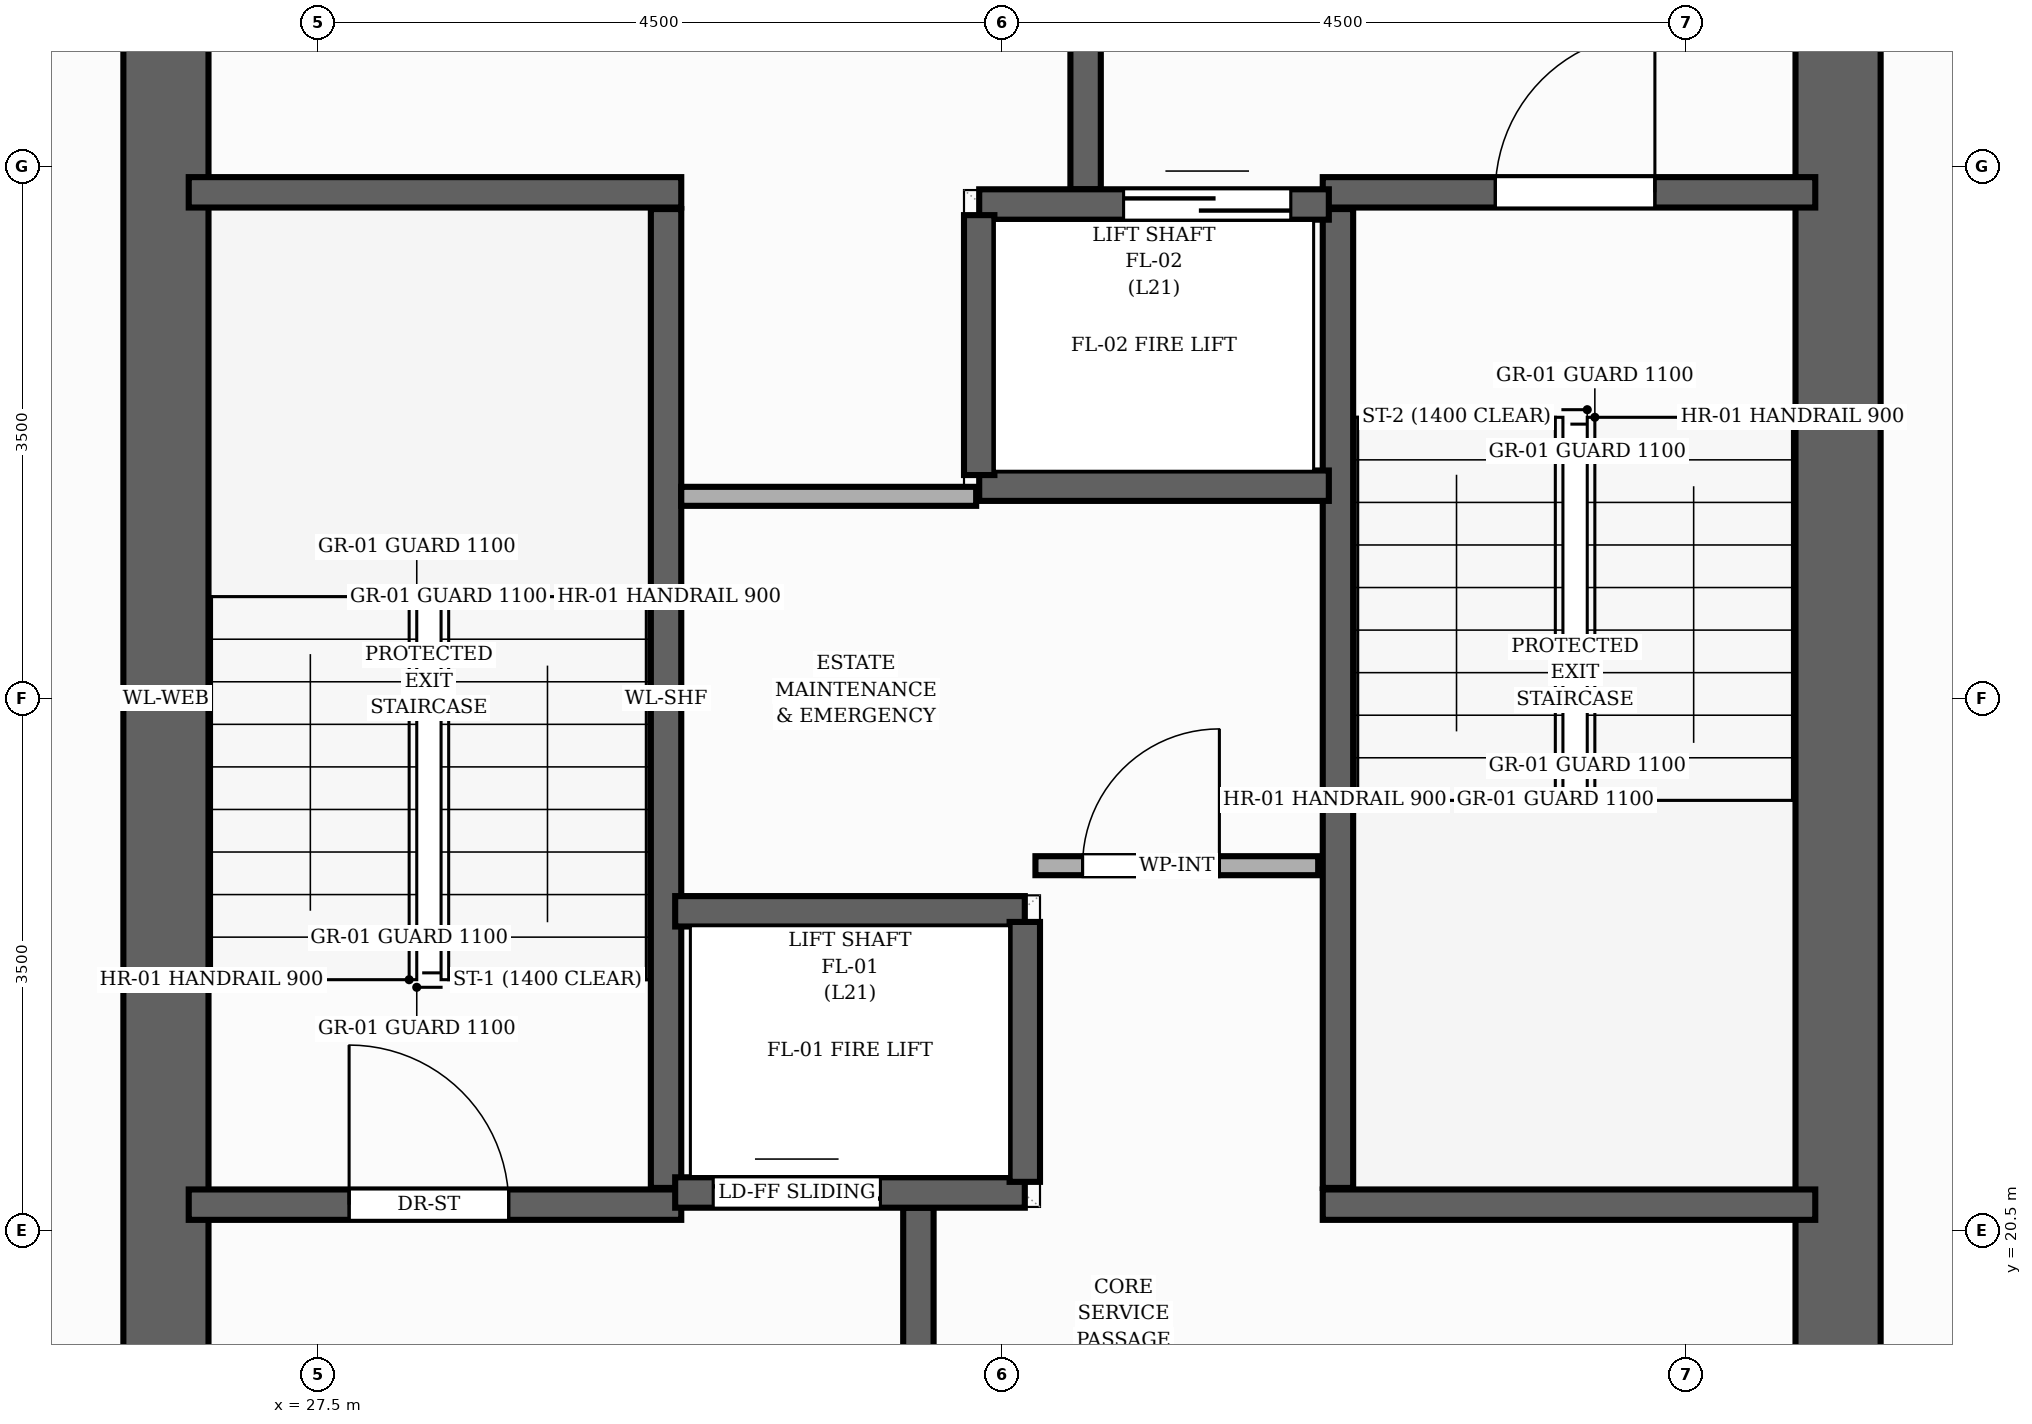
"""IFC4 building model, lengths in metres.
Left out: names, types, materials, properties, quantities, classifications, styles, units other than length and angle.
Written with IfcOpenShell. Run it as: python <this file> out.ifc"""

import sys

from ifc_helpers import new_model, si_unit, direction, frame, frame_2d, origin, place, context, subcontext, project, spatial, rectangle, extrude, element, fill, save


model = new_model("IFC4")
c1 = context("Model", 3, precision=1e-05, world=origin(), true_north=direction((0.0, 1.0)))
c2 = subcontext(c1, "Body", "Model", "MODEL_VIEW")
j1 = project(units=[si_unit("LENGTHUNIT", "METRE"), si_unit("PLANEANGLEUNIT", "RADIAN")], contexts=[c1])
p1 = place(None, origin())
s1 = spatial("IfcSite", under=j1, at=p1, CompositionType="ELEMENT")
p2 = place(p1, origin())
s2 = spatial("IfcBuilding", under=s1, at=p2, CompositionType="ELEMENT")
p3 = place(p2, frame((0.0, 0.0, 74.08)))
s3 = spatial("IfcBuildingStorey", under=s2, at=p3, CompositionType="ELEMENT", Elevation=74.08)
for number, where, z_axis, x_axis in (
    (1, (26.5, 17.35, 0.0), (0.0, 0.0, 1.0), (0.0, 1.0, 0.0)),
    (2, (37.5, 17.35, 0.0), (0.0, 0.0, 1.0), (0.0, 1.0, 0.0)),
):
    element("IfcWall", number, at=place(p3, frame(where, z_axis=z_axis, x_axis=x_axis)), inside=s3, PredefinedType="SHEAR", context=c2, shape_type="SweptSolid", body=[
        extrude(rectangle(XDim=13.3, YDim=0.56, at=frame_2d((6.65, 0.0))), origin(), (0.0, 0.0, 1.0), 3.2),
    ])
p4 = place(p3, frame((29.79, 20.78, 0.0), z_axis=(0.0, 0.0, 1.0), x_axis=(0.0, 1.0, 0.0)))
e3 = element("IfcWall", 3, at=p4, inside=s3, PredefinedType="SHEAR", context=c2, shape_type="SweptSolid", body=[
    extrude(rectangle(XDim=6.44, YDim=0.2, at=frame_2d((3.22, 0.0))), origin(), (0.0, 0.0, 1.0), 3.2),
])
p5 = place(p3, frame((26.65, 27.33, 0.0), z_axis=(0.0, 0.0, 1.0), x_axis=(1.0, 0.0, 0.0)))
e4 = element("IfcWall", 4, at=p5, inside=s3, PredefinedType="SHEAR", context=c2, shape_type="SweptSolid", body=[
    extrude(rectangle(XDim=3.24, YDim=0.2, at=frame_2d((1.62, 0.0))), origin(), (0.0, 0.0, 1.0), 3.2),
])
p6 = place(p3, frame((26.65, 20.67, 0.0), z_axis=(0.0, 0.0, 1.0), x_axis=(1.0, 0.0, 0.0)))
e5 = element("IfcWall", 5, at=p6, inside=s3, PredefinedType="SHEAR", context=c2, shape_type="SweptSolid", body=[
    extrude(rectangle(XDim=3.24, YDim=0.2, at=frame_2d((1.62, 0.0))), origin(), (0.0, 0.0, 1.0), 3.2),
])
p7 = place(p6, frame((1.055, 0.0, 0.0)))
e6 = element("IfcOpeningElement", 6, at=p7, cuts=e5, PredefinedType="OPENING", context=c2, shape_type="SweptSolid", body=[
    extrude(rectangle(XDim=1.05, YDim=2.15, at=frame_2d((0.525, 1.075))), frame((0.0, 0.11, 0.0), z_axis=(0.0, -1.0, 0.0), x_axis=(1.0, 0.0, 0.0)), (0.0, 0.0, 1.0), 0.22),
])
p8 = place(p3, frame((34.21, 20.78, 0.0), z_axis=(0.0, 0.0, 1.0), x_axis=(0.0, 1.0, 0.0)))
e7 = element("IfcWall", 7, at=p8, inside=s3, PredefinedType="SHEAR", context=c2, shape_type="SweptSolid", body=[
    extrude(rectangle(XDim=6.44, YDim=0.2, at=frame_2d((3.22, 0.0))), origin(), (0.0, 0.0, 1.0), 3.2),
])
p9 = place(p3, frame((34.11, 20.67, 0.0), z_axis=(0.0, 0.0, 1.0), x_axis=(1.0, 0.0, 0.0)))
e8 = element("IfcWall", 8, at=p9, inside=s3, PredefinedType="SHEAR", context=c2, shape_type="SweptSolid", body=[
    extrude(rectangle(XDim=3.24, YDim=0.2, at=frame_2d((1.62, 0.0))), origin(), (0.0, 0.0, 1.0), 3.2),
])
p10 = place(p3, frame((34.11, 27.33, 0.0), z_axis=(0.0, 0.0, 1.0), x_axis=(1.0, 0.0, 0.0)))
e9 = element("IfcWall", 9, at=p10, inside=s3, PredefinedType="SHEAR", context=c2, shape_type="SweptSolid", body=[
    extrude(rectangle(XDim=3.24, YDim=0.2, at=frame_2d((1.62, 0.0))), origin(), (0.0, 0.0, 1.0), 3.2),
])
p11 = place(p10, frame((1.135, 0.0, 0.0)))
e10 = element("IfcOpeningElement", 10, at=p11, cuts=e9, PredefinedType="OPENING", context=c2, shape_type="SweptSolid", body=[
    extrude(rectangle(XDim=1.05, YDim=2.15, at=frame_2d((0.525, 1.075))), frame((0.0, 0.11, 0.0), z_axis=(0.0, -1.0, 0.0), x_axis=(1.0, 0.0, 0.0)), (0.0, 0.0, 1.0), 0.22),
])
for number, where, z_axis, x_axis in (
    (11, (31.45, 17.15, 0.0), (0.0, 0.0, 1.0), (0.0, 1.0, 0.0)),
    (12, (32.55, 27.35, 0.0), (0.0, 0.0, 1.0), (0.0, 1.0, 0.0)),
):
    element("IfcWall", number, at=place(p3, frame(where, z_axis=z_axis, x_axis=x_axis)), inside=s3, PredefinedType="SHEAR", context=c2, shape_type="SweptSolid", body=[
        extrude(rectangle(XDim=3.5, YDim=0.2, at=frame_2d((1.75, 0.0))), origin(), (0.0, 0.0, 1.0), 3.2),
    ])
p12 = place(p3, frame((29.85, 20.75, 0.0), z_axis=(0.0, 0.0, 1.0), x_axis=(1.0, 0.0, 0.0)))
e13 = element("IfcWall", 13, at=p12, inside=s3, PredefinedType="SHEAR", context=c2, shape_type="SweptSolid", body=[
    extrude(rectangle(XDim=2.3, YDim=0.2, at=frame_2d((1.15, 0.0))), origin(), (0.0, 0.0, 1.0), 3.2),
])
p13 = place(p12, frame((0.25, 0.0, 0.0)))
e14 = element("IfcOpeningElement", 14, at=p13, cuts=e13, PredefinedType="OPENING", context=c2, shape_type="SweptSolid", body=[
    extrude(rectangle(XDim=1.1, YDim=2.15, at=frame_2d((0.55, 1.075))), frame((0.0, 0.11, 0.0), z_axis=(0.0, -1.0, 0.0), x_axis=(1.0, 0.0, 0.0)), (0.0, 0.0, 1.0), 0.22),
])
p14 = place(p3, frame((29.85, 22.6, 0.0), z_axis=(0.0, 0.0, 1.0), x_axis=(1.0, 0.0, 0.0)))
e15 = element("IfcWall", 15, at=p14, inside=s3, PredefinedType="SHEAR", context=c2, shape_type="SweptSolid", body=[
    extrude(rectangle(XDim=2.3, YDim=0.2, at=frame_2d((1.15, 0.0))), origin(), (0.0, 0.0, 1.0), 3.2),
])
p15 = place(p3, frame((32.15, 20.82, 0.0), z_axis=(0.0, 0.0, 1.0), x_axis=(0.0, 1.0, 0.0)))
e16 = element("IfcWall", 16, at=p15, inside=s3, PredefinedType="SHEAR", context=c2, shape_type="SweptSolid", body=[
    extrude(rectangle(XDim=1.71, YDim=0.2, at=frame_2d((0.855, 0.0))), origin(), (0.0, 0.0, 1.0), 3.2),
])
p16 = place(p3, frame((31.85, 27.25, 0.0), z_axis=(0.0, 0.0, 1.0), x_axis=(1.0, 0.0, 0.0)))
e17 = element("IfcWall", 17, at=p16, inside=s3, PredefinedType="SHEAR", context=c2, shape_type="SweptSolid", body=[
    extrude(rectangle(XDim=2.3, YDim=0.2, at=frame_2d((1.15, 0.0))), origin(), (0.0, 0.0, 1.0), 3.2),
])
p17 = place(p16, frame((0.95, 0.0, 0.0)))
e18 = element("IfcOpeningElement", 18, at=p17, cuts=e17, PredefinedType="OPENING", context=c2, shape_type="SweptSolid", body=[
    extrude(rectangle(XDim=1.1, YDim=2.15, at=frame_2d((0.55, 1.075))), frame((0.0, 0.11, 0.0), z_axis=(0.0, -1.0, 0.0), x_axis=(1.0, 0.0, 0.0)), (0.0, 0.0, 1.0), 0.22),
])
p18 = place(p3, frame((31.85, 25.4, 0.0), z_axis=(0.0, 0.0, 1.0), x_axis=(1.0, 0.0, 0.0)))
e19 = element("IfcWall", 19, at=p18, inside=s3, PredefinedType="SHEAR", context=c2, shape_type="SweptSolid", body=[
    extrude(rectangle(XDim=2.3, YDim=0.2, at=frame_2d((1.15, 0.0))), origin(), (0.0, 0.0, 1.0), 3.2),
])
p19 = place(p3, frame((31.85, 25.47, 0.0), z_axis=(0.0, 0.0, 1.0), x_axis=(0.0, 1.0, 0.0)))
e20 = element("IfcWall", 20, at=p19, inside=s3, PredefinedType="SHEAR", context=c2, shape_type="SweptSolid", body=[
    extrude(rectangle(XDim=1.71, YDim=0.2, at=frame_2d((0.855, 0.0))), origin(), (0.0, 0.0, 1.0), 3.2),
])
p20 = place(p3, frame((32.22, 22.9, 0.0), z_axis=(0.0, 0.0, 1.0), x_axis=(1.0, 0.0, 0.0)))
e21 = element("IfcWall", 21, at=p20, inside=s3, PredefinedType="PARTITIONING", context=c2, shape_type="SweptSolid", body=[
    extrude(rectangle(XDim=1.86, YDim=0.125, at=frame_2d((0.93, 0.0))), origin(), (0.0, 0.0, 1.0), 2.955),
])
p21 = place(p20, frame((0.31, 0.0, 0.0)))
e22 = element("IfcOpeningElement", 22, at=p21, cuts=e21, PredefinedType="OPENING", context=c2, shape_type="SweptSolid", body=[
    extrude(rectangle(XDim=0.9, YDim=2.1, at=frame_2d((0.45, 1.05))), frame((0.0, 0.073, 0.0), z_axis=(0.0, -1.0, 0.0), x_axis=(1.0, 0.0, 0.0)), (0.0, 0.0, 1.0), 0.145),
])
p22 = place(p3, frame((29.89, 25.33, 0.0), z_axis=(0.0, 0.0, 1.0), x_axis=(1.0, 0.0, 0.0)))
e23 = element("IfcWall", 23, at=p22, inside=s3, PredefinedType="PARTITIONING", context=c2, shape_type="SweptSolid", body=[
    extrude(rectangle(XDim=1.94, YDim=0.125, at=frame_2d((0.97, 0.0))), origin(), (0.0, 0.0, 1.0), 2.955),
])
p23 = place(p7, origin())
e24 = element("IfcDoor", 24, at=p23, inside=s3, OperationType="SINGLE_SWING_LEFT", PredefinedType="DOOR", context=c2, shape_type="SweptSolid", body=[
    extrude(rectangle(XDim=1.05, YDim=2.15, at=frame_2d((0.525, 1.075))), frame((0.0, 0.025, 0.0), z_axis=(0.0, -1.0, 0.0), x_axis=(1.0, 0.0, 0.0)), (0.0, 0.0, 1.0), 0.05),
])
fill(e6, e24)
p24 = place(p11, origin())
e25 = element("IfcDoor", 25, at=p24, inside=s3, OperationType="SINGLE_SWING_RIGHT", PredefinedType="DOOR", context=c2, shape_type="SweptSolid", body=[
    extrude(rectangle(XDim=1.05, YDim=2.15, at=frame_2d((0.525, 1.075))), frame((0.0, 0.025, 0.0), z_axis=(0.0, -1.0, 0.0), x_axis=(1.0, 0.0, 0.0)), (0.0, 0.0, 1.0), 0.05),
])
fill(e10, e25)
p25 = place(p13, origin())
e26 = element("IfcDoor", 26, at=p25, inside=s3, OperationType="DOUBLE_DOOR_SLIDING", PredefinedType="DOOR", context=c2, shape_type="SweptSolid", body=[
    extrude(rectangle(XDim=1.1, YDim=2.15, at=frame_2d((0.55, 1.075))), frame((0.0, 0.025, 0.0), z_axis=(0.0, -1.0, 0.0), x_axis=(1.0, 0.0, 0.0)), (0.0, 0.0, 1.0), 0.05),
])
fill(e14, e26)
p26 = place(p17, origin())
e27 = element("IfcDoor", 27, at=p26, inside=s3, OperationType="DOUBLE_DOOR_SLIDING", PredefinedType="DOOR", context=c2, shape_type="SweptSolid", body=[
    extrude(rectangle(XDim=1.1, YDim=2.15, at=frame_2d((0.55, 1.075))), frame((0.0, 0.025, 0.0), z_axis=(0.0, -1.0, 0.0), x_axis=(1.0, 0.0, 0.0)), (0.0, 0.0, 1.0), 0.05),
])
fill(e18, e27)
p27 = place(p21, origin())
e28 = element("IfcDoor", 28, at=p27, inside=s3, OperationType="SINGLE_SWING_RIGHT", PredefinedType="DOOR", context=c2, shape_type="SweptSolid", body=[
    extrude(rectangle(XDim=0.9, YDim=2.1, at=frame_2d((0.45, 1.05))), frame((0.0, 0.025, 0.0), z_axis=(0.0, -1.0, 0.0), x_axis=(1.0, 0.0, 0.0)), (0.0, 0.0, 1.0), 0.05),
])
fill(e22, e28)
save(model, sys.argv[1])
